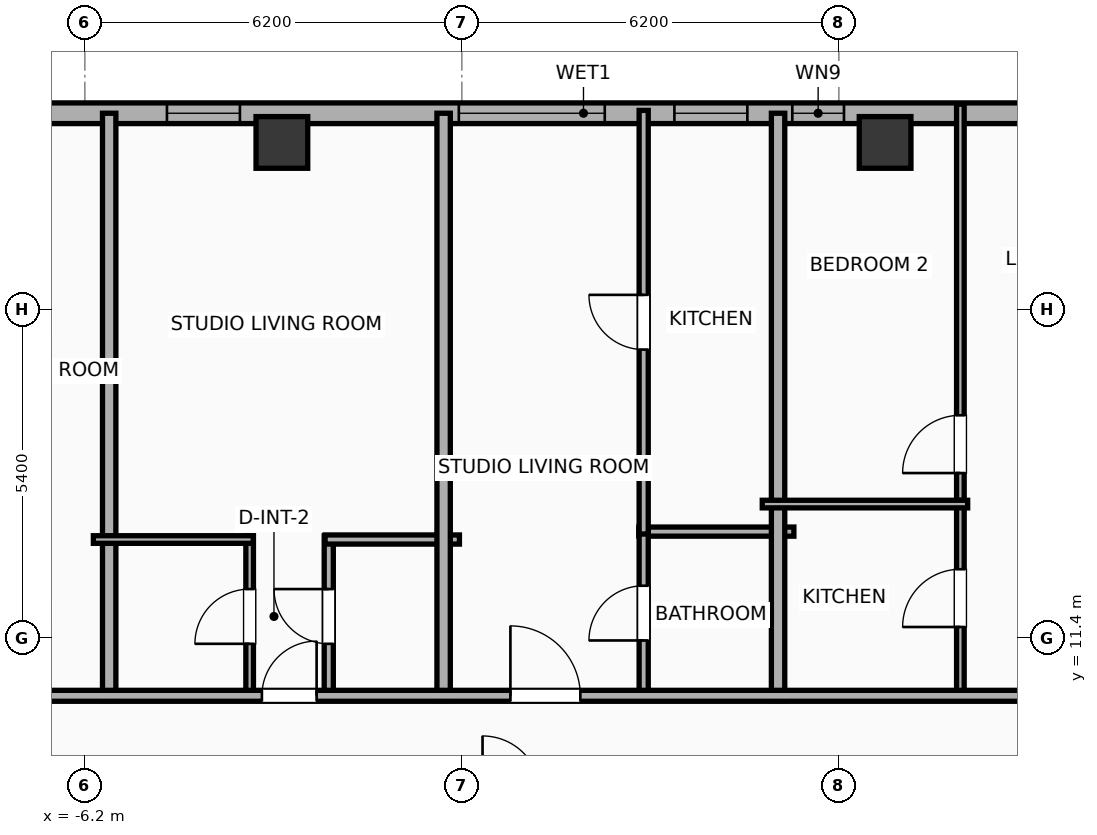
"""IFC4 building model, lengths in metres.
Left out: names, types, materials, properties, quantities, classifications, styles, units other than length and angle.
Written with IfcOpenShell. Run it as: python <this file> out.ifc"""

import sys

from ifc_helpers import new_model, si_unit, direction, frame, frame_2d, origin, origin_2d, place, context, subcontext, project, spatial, rectangle, hollow_rectangle, extrude, element, fill, save


model = new_model("IFC4")
c1 = context("Model", 3, precision=1e-05, world=origin(), true_north=direction((0.0, 1.0)))
c2 = subcontext(c1, "Body", "Model", "MODEL_VIEW")
j1 = project(units=[si_unit("LENGTHUNIT", "METRE"), si_unit("PLANEANGLEUNIT", "RADIAN")], contexts=[c1])
p1 = place(None, origin())
s1 = spatial("IfcSite", under=j1, at=p1, CompositionType="ELEMENT")
p2 = place(p1, origin())
s2 = spatial("IfcBuilding", under=s1, at=p2, CompositionType="ELEMENT")
p3 = place(p2, frame((0.0, 0.0, 204.1)))
s3 = spatial("IfcBuildingStorey", under=s2, at=p3, CompositionType="ELEMENT", Elevation=204.1)
for number, where, z_axis, x_axis in (
    (1, (6.96, 19.55, 0.0), (0.0, 0.0, 1.0), (1.0, 0.0, 0.0)),
    (2, (-2.96, 19.55, 0.0), (0.0, 0.0, 1.0), (1.0, 0.0, 0.0)),
):
    element("IfcColumn", number, at=place(p3, frame(where, z_axis=z_axis, x_axis=x_axis)), inside=s3, PredefinedType="COLUMN", context=c2, shape_type="SweptSolid", body=[
        extrude(hollow_rectangle(XDim=0.85, YDim=0.85, WallThickness=0.028, at=origin_2d()), origin(), (0.0, 0.0, 1.0), 3.9),
    ])
p4 = place(p3, frame((-22.783, 20.03, 0.0), z_axis=(0.0, 0.0, 1.0), x_axis=(1.0, 0.0, 0.0)))
e3 = element("IfcWall", 3, at=p4, inside=s3, PredefinedType="ELEMENTEDWALL", context=c2, shape_type="SweptSolid", body=[
    extrude(rectangle(XDim=49.566, YDim=0.34, at=frame_2d((24.783, 0.0))), origin(), (0.0, 0.0, 1.0), 3.65),
])
p5 = place(p4, frame((6.211, 0.0, 0.75)))
e4 = element("IfcOpeningElement", 4, at=p5, cuts=e3, PredefinedType="OPENING", context=c2, shape_type="SweptSolid", body=[
    extrude(rectangle(XDim=2.4, YDim=2.1, at=frame_2d((1.2, 1.05))), frame((0.0, 0.18, 0.0), z_axis=(0.0, -1.0, 0.0), x_axis=(1.0, 0.0, 0.0)), (0.0, 0.0, 1.0), 0.36),
])
p6 = place(p4, frame((22.733, 0.0, 0.75)))
e5 = element("IfcOpeningElement", 5, at=p6, cuts=e3, PredefinedType="OPENING", context=c2, shape_type="SweptSolid", body=[
    extrude(rectangle(XDim=2.4, YDim=2.1, at=frame_2d((1.2, 1.05))), frame((0.0, 0.18, 0.0), z_axis=(0.0, -1.0, 0.0), x_axis=(1.0, 0.0, 0.0)), (0.0, 0.0, 1.0), 0.36),
])
p7 = place(p4, frame((1.132, 0.0, 0.75)))
e6 = element("IfcOpeningElement", 6, at=p7, cuts=e3, PredefinedType="OPENING", context=c2, shape_type="SweptSolid", body=[
    extrude(rectangle(XDim=1.2, YDim=2.05, at=frame_2d((0.6, 1.025))), frame((0.0, 0.18, 0.0), z_axis=(0.0, -1.0, 0.0), x_axis=(1.0, 0.0, 0.0)), (0.0, 0.0, 1.0), 0.36),
])
p8 = place(p4, frame((3.678, 0.0, 0.75)))
e7 = element("IfcOpeningElement", 7, at=p8, cuts=e3, PredefinedType="OPENING", context=c2, shape_type="SweptSolid", body=[
    extrude(rectangle(XDim=1.2, YDim=2.05, at=frame_2d((0.6, 1.025))), frame((0.0, 0.18, 0.0), z_axis=(0.0, -1.0, 0.0), x_axis=(1.0, 0.0, 0.0)), (0.0, 0.0, 1.0), 0.36),
])
p9 = place(p4, frame((14.804, 0.0, 0.75)))
e8 = element("IfcOpeningElement", 8, at=p9, cuts=e3, PredefinedType="OPENING", context=c2, shape_type="SweptSolid", body=[
    extrude(rectangle(XDim=1.2, YDim=2.05, at=frame_2d((0.6, 1.025))), frame((0.0, 0.18, 0.0), z_axis=(0.0, -1.0, 0.0), x_axis=(1.0, 0.0, 0.0)), (0.0, 0.0, 1.0), 0.36),
])
p10 = place(p4, frame((12.054, 0.0, 0.75)))
e9 = element("IfcOpeningElement", 9, at=p10, cuts=e3, PredefinedType="OPENING", context=c2, shape_type="SweptSolid", body=[
    extrude(rectangle(XDim=1.2, YDim=2.05, at=frame_2d((0.6, 1.025))), frame((0.0, 0.18, 0.0), z_axis=(0.0, -1.0, 0.0), x_axis=(1.0, 0.0, 0.0)), (0.0, 0.0, 1.0), 0.36),
])
p11 = place(p4, frame((17.933, 0.0, 0.75)))
e10 = element("IfcOpeningElement", 10, at=p11, cuts=e3, PredefinedType="OPENING", context=c2, shape_type="SweptSolid", body=[
    extrude(rectangle(XDim=1.2, YDim=2.05, at=frame_2d((0.6, 1.025))), frame((0.0, 0.18, 0.0), z_axis=(0.0, -1.0, 0.0), x_axis=(1.0, 0.0, 0.0)), (0.0, 0.0, 1.0), 0.36),
])
p12 = place(p4, frame((26.278, 0.0, 0.75)))
e11 = element("IfcOpeningElement", 11, at=p12, cuts=e3, PredefinedType="OPENING", context=c2, shape_type="SweptSolid", body=[
    extrude(rectangle(XDim=1.2, YDim=2.05, at=frame_2d((0.6, 1.025))), frame((0.0, 0.18, 0.0), z_axis=(0.0, -1.0, 0.0), x_axis=(1.0, 0.0, 0.0)), (0.0, 0.0, 1.0), 0.36),
])
p13 = place(p4, frame((32.677, 0.0, 0.75)))
e12 = element("IfcOpeningElement", 12, at=p13, cuts=e3, PredefinedType="OPENING", context=c2, shape_type="SweptSolid", body=[
    extrude(rectangle(XDim=1.2, YDim=2.05, at=frame_2d((0.6, 1.025))), frame((0.0, 0.18, 0.0), z_axis=(0.0, -1.0, 0.0), x_axis=(1.0, 0.0, 0.0)), (0.0, 0.0, 1.0), 0.36),
])
p14 = place(p4, frame((28.217, 0.0, 0.75)))
e13 = element("IfcOpeningElement", 13, at=p14, cuts=e3, PredefinedType="OPENING", context=c2, shape_type="SweptSolid", body=[
    extrude(rectangle(XDim=0.85, YDim=2.05, at=frame_2d((0.425, 1.025))), frame((0.0, 0.18, 0.0), z_axis=(0.0, -1.0, 0.0), x_axis=(1.0, 0.0, 0.0)), (0.0, 0.0, 1.0), 0.36),
])
p15 = place(p4, frame((36.678, 0.0, 0.75)))
e14 = element("IfcOpeningElement", 14, at=p15, cuts=e3, PredefinedType="OPENING", context=c2, shape_type="SweptSolid", body=[
    extrude(rectangle(XDim=1.2, YDim=2.05, at=frame_2d((0.6, 1.025))), frame((0.0, 0.18, 0.0), z_axis=(0.0, -1.0, 0.0), x_axis=(1.0, 0.0, 0.0)), (0.0, 0.0, 1.0), 0.36),
])
p16 = place(p4, frame((40.307, 0.0, 0.75)))
e15 = element("IfcOpeningElement", 15, at=p16, cuts=e3, PredefinedType="OPENING", context=c2, shape_type="SweptSolid", body=[
    extrude(rectangle(XDim=1.2, YDim=2.05, at=frame_2d((0.6, 1.025))), frame((0.0, 0.18, 0.0), z_axis=(0.0, -1.0, 0.0), x_axis=(1.0, 0.0, 0.0)), (0.0, 0.0, 1.0), 0.36),
])
p17 = place(p4, frame((43.696, 0.0, 0.75)))
e16 = element("IfcOpeningElement", 16, at=p17, cuts=e3, PredefinedType="OPENING", context=c2, shape_type="SweptSolid", body=[
    extrude(rectangle(XDim=1.2, YDim=2.05, at=frame_2d((0.6, 1.025))), frame((0.0, 0.18, 0.0), z_axis=(0.0, -1.0, 0.0), x_axis=(1.0, 0.0, 0.0)), (0.0, 0.0, 1.0), 0.36),
])
p18 = place(p4, frame((46.739, 0.0, 0.75)))
e17 = element("IfcOpeningElement", 17, at=p18, cuts=e3, PredefinedType="OPENING", context=c2, shape_type="SweptSolid", body=[
    extrude(rectangle(XDim=1.2, YDim=2.05, at=frame_2d((0.6, 1.025))), frame((0.0, 0.18, 0.0), z_axis=(0.0, -1.0, 0.0), x_axis=(1.0, 0.0, 0.0)), (0.0, 0.0, 1.0), 0.36),
])
p19 = place(p3, frame((-5.8, 10.37, 0.0), z_axis=(0.0, 0.0, 1.0), x_axis=(0.0, 1.0, 0.0)))
e18 = element("IfcWall", 18, at=p19, inside=s3, PredefinedType="PARTITIONING", context=c2, shape_type="SweptSolid", body=[
    extrude(rectangle(XDim=9.66, YDim=0.22, at=frame_2d((4.83, 0.0))), origin(), (0.0, 0.0, 1.0), 3.65),
])
p20 = place(p3, frame((-3.49, 10.43, 0.0), z_axis=(0.0, 0.0, 1.0), x_axis=(0.0, 1.0, 0.0)))
e19 = element("IfcWall", 19, at=p20, inside=s3, PredefinedType="PARTITIONING", context=c2, shape_type="SweptSolid", body=[
    extrude(rectangle(XDim=2.65, YDim=0.125, at=frame_2d((1.325, 0.0))), origin(), (0.0, 0.0, 1.0), 3.09),
])
p21 = place(p20, frame((0.875, 0.0, 0.0)))
e20 = element("IfcOpeningElement", 20, at=p21, cuts=e19, PredefinedType="OPENING", context=c2, shape_type="SweptSolid", body=[
    extrude(rectangle(XDim=0.9, YDim=2.05, at=frame_2d((0.45, 1.025))), frame((0.0, 0.073, 0.0), z_axis=(0.0, -1.0, 0.0), x_axis=(1.0, 0.0, 0.0)), (0.0, 0.0, 1.0), 0.145),
])
p22 = place(p3, frame((-2.189, 10.43, 0.0), z_axis=(0.0, 0.0, 1.0), x_axis=(0.0, 1.0, 0.0)))
e21 = element("IfcWall", 21, at=p22, inside=s3, PredefinedType="PLUMBINGWALL", context=c2, shape_type="SweptSolid", body=[
    extrude(rectangle(XDim=2.65, YDim=0.15, at=frame_2d((1.325, 0.0))), origin(), (0.0, 0.0, 1.0), 3.65),
])
p23 = place(p22, frame((0.875, 0.0, 0.0)))
e22 = element("IfcOpeningElement", 22, at=p23, cuts=e21, PredefinedType="OPENING", context=c2, shape_type="SweptSolid", body=[
    extrude(rectangle(XDim=0.9, YDim=2.05, at=frame_2d((0.45, 1.025))), frame((0.0, 0.085, 0.0), z_axis=(0.0, -1.0, 0.0), x_axis=(1.0, 0.0, 0.0)), (0.0, 0.0, 1.0), 0.17),
])
p24 = place(p3, frame((-6.06, 13.02, 0.0), z_axis=(0.0, 0.0, 1.0), x_axis=(1.0, 0.0, 0.0)))
e23 = element("IfcWall", 23, at=p24, inside=s3, PredefinedType="PARTITIONING", context=c2, shape_type="SweptSolid", body=[
    extrude(rectangle(XDim=2.63, YDim=0.125, at=frame_2d((1.315, 0.0))), origin(), (0.0, 0.0, 1.0), 3.65),
])
p25 = place(p3, frame((-2.249, 13.02, 0.0), z_axis=(0.0, 0.0, 1.0), x_axis=(1.0, 0.0, 0.0)))
e24 = element("IfcWall", 24, at=p25, inside=s3, PredefinedType="PLUMBINGWALL", context=c2, shape_type="SweptSolid", body=[
    extrude(rectangle(XDim=2.209, YDim=0.15, at=frame_2d((1.104, 0.0))), origin(), (0.0, 0.0, 1.0), 3.65),
])
p26 = place(p3, frame((-0.3, 10.37, 0.0), z_axis=(0.0, 0.0, 1.0), x_axis=(0.0, 1.0, 0.0)))
e25 = element("IfcWall", 25, at=p26, inside=s3, PredefinedType="PARTITIONING", context=c2, shape_type="SweptSolid", body=[
    extrude(rectangle(XDim=9.66, YDim=0.22, at=frame_2d((4.83, 0.0))), origin(), (0.0, 0.0, 1.0), 3.65),
])
p27 = place(p3, frame((2.91, 13.15, 0.0), z_axis=(0.0, 0.0, 1.0), x_axis=(1.0, 0.0, 0.0)))
e26 = element("IfcWall", 26, at=p27, inside=s3, PredefinedType="PLUMBINGWALL", context=c2, shape_type="SweptSolid", body=[
    extrude(rectangle(XDim=2.55, YDim=0.15, at=frame_2d((1.275, 0.0))), origin(), (0.0, 0.0, 1.0), 3.65),
])
p28 = place(p3, frame((2.99, 10.43, 0.0), z_axis=(0.0, 0.0, 1.0), x_axis=(0.0, 1.0, 0.0)))
e27 = element("IfcWall", 27, at=p28, inside=s3, PredefinedType="PLUMBINGWALL", context=c2, shape_type="SweptSolid", body=[
    extrude(rectangle(XDim=2.76, YDim=0.15, at=frame_2d((1.38, 0.0))), origin(), (0.0, 0.0, 1.0), 3.65),
])
p29 = place(p28, frame((0.93, 0.0, 0.0)))
e28 = element("IfcOpeningElement", 28, at=p29, cuts=e27, PredefinedType="OPENING", context=c2, shape_type="SweptSolid", body=[
    extrude(rectangle(XDim=0.9, YDim=2.05, at=frame_2d((0.45, 1.025))), frame((0.0, 0.085, 0.0), z_axis=(0.0, -1.0, 0.0), x_axis=(1.0, 0.0, 0.0)), (0.0, 0.0, 1.0), 0.17),
])
p30 = place(p3, frame((2.99, 13.11, 0.0), z_axis=(0.0, 0.0, 1.0), x_axis=(0.0, 1.0, 0.0)))
e29 = element("IfcWall", 29, at=p30, inside=s3, PredefinedType="PLUMBINGWALL", context=c2, shape_type="SweptSolid", body=[
    extrude(rectangle(XDim=6.967, YDim=0.15, at=frame_2d((3.483, 0.0))), origin(), (0.0, 0.0, 1.0), 3.65),
])
p31 = place(p30, frame((3.033, 0.0, 0.0)))
e30 = element("IfcOpeningElement", 30, at=p31, cuts=e29, PredefinedType="OPENING", context=c2, shape_type="SweptSolid", body=[
    extrude(rectangle(XDim=0.9, YDim=2.05, at=frame_2d((0.45, 1.025))), frame((0.0, 0.085, 0.0), z_axis=(0.0, -1.0, 0.0), x_axis=(1.0, 0.0, 0.0)), (0.0, 0.0, 1.0), 0.17),
])
p32 = place(p3, frame((5.2, 10.37, 0.0), z_axis=(0.0, 0.0, 1.0), x_axis=(0.0, 1.0, 0.0)))
e31 = element("IfcWall", 31, at=p32, inside=s3, PredefinedType="PARTITIONING", context=c2, shape_type="SweptSolid", body=[
    extrude(rectangle(XDim=9.66, YDim=0.22, at=frame_2d((4.83, 0.0))), origin(), (0.0, 0.0, 1.0), 3.09),
])
p33 = place(p3, frame((8.198, 13.541, 0.0), z_axis=(0.0, 0.0, 1.0), x_axis=(0.0, 1.0, 0.0)))
e32 = element("IfcWall", 32, at=p33, inside=s3, PredefinedType="PARTITIONING", context=c2, shape_type="SweptSolid", body=[
    extrude(rectangle(XDim=6.639, YDim=0.125, at=frame_2d((3.32, 0.0))), origin(), (0.0, 0.0, 1.0), 3.65),
])
p34 = place(p33, frame((0.573, 0.0, 0.0)))
e33 = element("IfcOpeningElement", 33, at=p34, cuts=e32, PredefinedType="OPENING", context=c2, shape_type="SweptSolid", body=[
    extrude(rectangle(XDim=0.95, YDim=2.05, at=frame_2d((0.475, 1.025))), frame((0.0, 0.073, 0.0), z_axis=(0.0, -1.0, 0.0), x_axis=(1.0, 0.0, 0.0)), (0.0, 0.0, 1.0), 0.145),
])
p35 = place(p3, frame((8.198, 10.43, 0.0), z_axis=(0.0, 0.0, 1.0), x_axis=(0.0, 1.0, 0.0)))
e34 = element("IfcWall", 34, at=p35, inside=s3, PredefinedType="PARTITIONING", context=c2, shape_type="SweptSolid", body=[
    extrude(rectangle(XDim=3.236, YDim=0.125, at=frame_2d((1.618, 0.0))), origin(), (0.0, 0.0, 1.0), 3.65),
])
p36 = place(p35, frame((1.152, 0.0, 0.0)))
e35 = element("IfcOpeningElement", 35, at=p36, cuts=e34, PredefinedType="OPENING", context=c2, shape_type="SweptSolid", body=[
    extrude(rectangle(XDim=0.95, YDim=2.05, at=frame_2d((0.475, 1.025))), frame((0.0, 0.073, 0.0), z_axis=(0.0, -1.0, 0.0), x_axis=(1.0, 0.0, 0.0)), (0.0, 0.0, 1.0), 0.145),
])
p37 = place(p3, frame((4.94, 13.603, 0.0), z_axis=(0.0, 0.0, 1.0), x_axis=(1.0, 0.0, 0.0)))
e36 = element("IfcWall", 36, at=p37, inside=s3, PredefinedType="PARTITIONING", context=c2, shape_type="SweptSolid", body=[
    extrude(rectangle(XDim=3.378, YDim=0.125, at=frame_2d((1.689, 0.0))), origin(), (0.0, 0.0, 1.0), 3.65),
])
p38 = place(p3, frame((-26.23, 10.45, 0.0), z_axis=(0.0, 0.0, 1.0), x_axis=(1.0, 0.0, 0.0)))
e37 = element("IfcWall", 37, at=p38, inside=s3, PredefinedType="PARTITIONING", context=c2, shape_type="SweptSolid", body=[
    extrude(rectangle(XDim=56.46, YDim=0.18, at=frame_2d((28.23, 0.0))), origin(), (0.0, 0.0, 1.0), 3.65),
])
p39 = place(p38, frame((4.41, 0.0, 0.0)))
e38 = element("IfcOpeningElement", 38, at=p39, cuts=e37, PredefinedType="OPENING", context=c2, shape_type="SweptSolid", body=[
    extrude(rectangle(XDim=1.15, YDim=2.05, at=frame_2d((0.575, 1.025))), frame((0.0, 0.1, 0.0), z_axis=(0.0, -1.0, 0.0), x_axis=(1.0, 0.0, 0.0)), (0.0, 0.0, 1.0), 0.2),
])
p40 = place(p38, frame((11.943, 0.0, 0.0)))
e39 = element("IfcOpeningElement", 39, at=p40, cuts=e37, PredefinedType="OPENING", context=c2, shape_type="SweptSolid", body=[
    extrude(rectangle(XDim=0.9, YDim=2.05, at=frame_2d((0.45, 1.025))), frame((0.0, 0.1, 0.0), z_axis=(0.0, -1.0, 0.0), x_axis=(1.0, 0.0, 0.0)), (0.0, 0.0, 1.0), 0.2),
])
p41 = place(p38, frame((18.243, 0.0, 0.0)))
e40 = element("IfcOpeningElement", 40, at=p41, cuts=e37, PredefinedType="OPENING", context=c2, shape_type="SweptSolid", body=[
    extrude(rectangle(XDim=1.15, YDim=2.05, at=frame_2d((0.575, 1.025))), frame((0.0, 0.1, 0.0), z_axis=(0.0, -1.0, 0.0), x_axis=(1.0, 0.0, 0.0)), (0.0, 0.0, 1.0), 0.2),
])
p42 = place(p38, frame((22.941, 0.0, 0.0)))
e41 = element("IfcOpeningElement", 41, at=p42, cuts=e37, PredefinedType="OPENING", context=c2, shape_type="SweptSolid", body=[
    extrude(rectangle(XDim=0.9, YDim=2.05, at=frame_2d((0.45, 1.025))), frame((0.0, 0.1, 0.0), z_axis=(0.0, -1.0, 0.0), x_axis=(1.0, 0.0, 0.0)), (0.0, 0.0, 1.0), 0.2),
])
p43 = place(p38, frame((27.028, 0.0, 0.0)))
e42 = element("IfcOpeningElement", 42, at=p43, cuts=e37, PredefinedType="OPENING", context=c2, shape_type="SweptSolid", body=[
    extrude(rectangle(XDim=1.15, YDim=2.05, at=frame_2d((0.575, 1.025))), frame((0.0, 0.1, 0.0), z_axis=(0.0, -1.0, 0.0), x_axis=(1.0, 0.0, 0.0)), (0.0, 0.0, 1.0), 0.2),
])
p44 = place(p38, frame((36.864, 0.0, 0.0)))
e43 = element("IfcOpeningElement", 43, at=p44, cuts=e37, PredefinedType="OPENING", context=c2, shape_type="SweptSolid", body=[
    extrude(rectangle(XDim=1.15, YDim=2.05, at=frame_2d((0.575, 1.025))), frame((0.0, 0.1, 0.0), z_axis=(0.0, -1.0, 0.0), x_axis=(1.0, 0.0, 0.0)), (0.0, 0.0, 1.0), 0.2),
])
p45 = place(p38, frame((45.655, 0.0, 0.0)))
e44 = element("IfcOpeningElement", 44, at=p45, cuts=e37, PredefinedType="OPENING", context=c2, shape_type="SweptSolid", body=[
    extrude(rectangle(XDim=0.9, YDim=2.05, at=frame_2d((0.45, 1.025))), frame((0.0, 0.1, 0.0), z_axis=(0.0, -1.0, 0.0), x_axis=(1.0, 0.0, 0.0)), (0.0, 0.0, 1.0), 0.2),
])
p46 = place(p38, frame((52.576, 0.0, 0.0)))
e45 = element("IfcOpeningElement", 45, at=p46, cuts=e37, PredefinedType="OPENING", context=c2, shape_type="SweptSolid", body=[
    extrude(rectangle(XDim=1.15, YDim=2.05, at=frame_2d((0.575, 1.025))), frame((0.0, 0.1, 0.0), z_axis=(0.0, -1.0, 0.0), x_axis=(1.0, 0.0, 0.0)), (0.0, 0.0, 1.0), 0.2),
])
p47 = place(p6, origin())
e46 = element("IfcWindow", 46, at=p47, inside=s3, PartitioningType="SINGLE_PANEL", PredefinedType="WINDOW", context=c2, shape_type="SweptSolid", body=[
    extrude(rectangle(XDim=2.4, YDim=2.1, at=frame_2d((1.2, 1.05))), frame((0.0, 0.03, 0.0), z_axis=(0.0, -1.0, 0.0), x_axis=(1.0, 0.0, 0.0)), (0.0, 0.0, 1.0), 0.06),
])
fill(e5, e46)
p48 = place(p11, origin())
e47 = element("IfcWindow", 47, at=p48, inside=s3, PartitioningType="SINGLE_PANEL", PredefinedType="WINDOW", context=c2, shape_type="SweptSolid", body=[
    extrude(rectangle(XDim=1.2, YDim=2.05, at=frame_2d((0.6, 1.025))), frame((0.0, 0.03, 0.0), z_axis=(0.0, -1.0, 0.0), x_axis=(1.0, 0.0, 0.0)), (0.0, 0.0, 1.0), 0.06),
])
fill(e10, e47)
p49 = place(p12, origin())
e48 = element("IfcWindow", 48, at=p49, inside=s3, PartitioningType="SINGLE_PANEL", PredefinedType="WINDOW", context=c2, shape_type="SweptSolid", body=[
    extrude(rectangle(XDim=1.2, YDim=2.05, at=frame_2d((0.6, 1.025))), frame((0.0, 0.03, 0.0), z_axis=(0.0, -1.0, 0.0), x_axis=(1.0, 0.0, 0.0)), (0.0, 0.0, 1.0), 0.06),
])
fill(e11, e48)
p50 = place(p14, origin())
e49 = element("IfcWindow", 49, at=p50, inside=s3, PartitioningType="SINGLE_PANEL", PredefinedType="WINDOW", context=c2, shape_type="SweptSolid", body=[
    extrude(rectangle(XDim=0.85, YDim=2.05, at=frame_2d((0.425, 1.025))), frame((0.0, 0.03, 0.0), z_axis=(0.0, -1.0, 0.0), x_axis=(1.0, 0.0, 0.0)), (0.0, 0.0, 1.0), 0.06),
])
fill(e13, e49)
p51 = place(p21, origin())
e50 = element("IfcDoor", 50, at=p51, inside=s3, OperationType="SINGLE_SWING_LEFT", PredefinedType="DOOR", context=c2, shape_type="SweptSolid", body=[
    extrude(rectangle(XDim=0.9, YDim=2.05, at=frame_2d((0.45, 1.025))), frame((0.0, 0.025, 0.0), z_axis=(0.0, -1.0, 0.0), x_axis=(1.0, 0.0, 0.0)), (0.0, 0.0, 1.0), 0.05),
])
fill(e20, e50)
p52 = place(p23, origin())
e51 = element("IfcDoor", 51, at=p52, inside=s3, OperationType="SINGLE_SWING_RIGHT", PredefinedType="DOOR", context=c2, shape_type="SweptSolid", body=[
    extrude(rectangle(XDim=0.9, YDim=2.05, at=frame_2d((0.45, 1.025))), frame((0.0, 0.025, 0.0), z_axis=(0.0, -1.0, 0.0), x_axis=(1.0, 0.0, 0.0)), (0.0, 0.0, 1.0), 0.05),
])
fill(e22, e51)
p53 = place(p29, origin())
e52 = element("IfcDoor", 52, at=p53, inside=s3, OperationType="SINGLE_SWING_LEFT", PredefinedType="DOOR", context=c2, shape_type="SweptSolid", body=[
    extrude(rectangle(XDim=0.9, YDim=2.05, at=frame_2d((0.45, 1.025))), frame((0.0, 0.025, 0.0), z_axis=(0.0, -1.0, 0.0), x_axis=(1.0, 0.0, 0.0)), (0.0, 0.0, 1.0), 0.05),
])
fill(e28, e52)
p54 = place(p31, origin())
e53 = element("IfcDoor", 53, at=p54, inside=s3, OperationType="SINGLE_SWING_RIGHT", PredefinedType="DOOR", context=c2, shape_type="SweptSolid", body=[
    extrude(rectangle(XDim=0.9, YDim=2.05, at=frame_2d((0.45, 1.025))), frame((0.0, 0.025, 0.0), z_axis=(0.0, -1.0, 0.0), x_axis=(1.0, 0.0, 0.0)), (0.0, 0.0, 1.0), 0.05),
])
fill(e30, e53)
p55 = place(p34, origin())
e54 = element("IfcDoor", 54, at=p55, inside=s3, OperationType="SINGLE_SWING_LEFT", PredefinedType="DOOR", context=c2, shape_type="SweptSolid", body=[
    extrude(rectangle(XDim=0.95, YDim=2.05, at=frame_2d((0.475, 1.025))), frame((0.0, 0.025, 0.0), z_axis=(0.0, -1.0, 0.0), x_axis=(1.0, 0.0, 0.0)), (0.0, 0.0, 1.0), 0.05),
])
fill(e33, e54)
p56 = place(p36, origin())
e55 = element("IfcDoor", 55, at=p56, inside=s3, OperationType="SINGLE_SWING_LEFT", PredefinedType="DOOR", context=c2, shape_type="SweptSolid", body=[
    extrude(rectangle(XDim=0.95, YDim=2.05, at=frame_2d((0.475, 1.025))), frame((0.0, 0.025, 0.0), z_axis=(0.0, -1.0, 0.0), x_axis=(1.0, 0.0, 0.0)), (0.0, 0.0, 1.0), 0.05),
])
fill(e35, e55)
p57 = place(p42, origin())
e56 = element("IfcDoor", 56, at=p57, inside=s3, OperationType="SINGLE_SWING_RIGHT", PredefinedType="DOOR", context=c2, shape_type="SweptSolid", body=[
    extrude(rectangle(XDim=0.9, YDim=2.05, at=frame_2d((0.45, 1.025))), frame((0.0, 0.025, 0.0), z_axis=(0.0, -1.0, 0.0), x_axis=(1.0, 0.0, 0.0)), (0.0, 0.0, 1.0), 0.05),
])
fill(e41, e56)
p58 = place(p43, origin())
e57 = element("IfcDoor", 57, at=p58, inside=s3, OperationType="SINGLE_SWING_LEFT", PredefinedType="DOOR", context=c2, shape_type="SweptSolid", body=[
    extrude(rectangle(XDim=1.15, YDim=2.05, at=frame_2d((0.575, 1.025))), frame((0.0, 0.025, 0.0), z_axis=(0.0, -1.0, 0.0), x_axis=(1.0, 0.0, 0.0)), (0.0, 0.0, 1.0), 0.05),
])
fill(e42, e57)
save(model, sys.argv[1])
